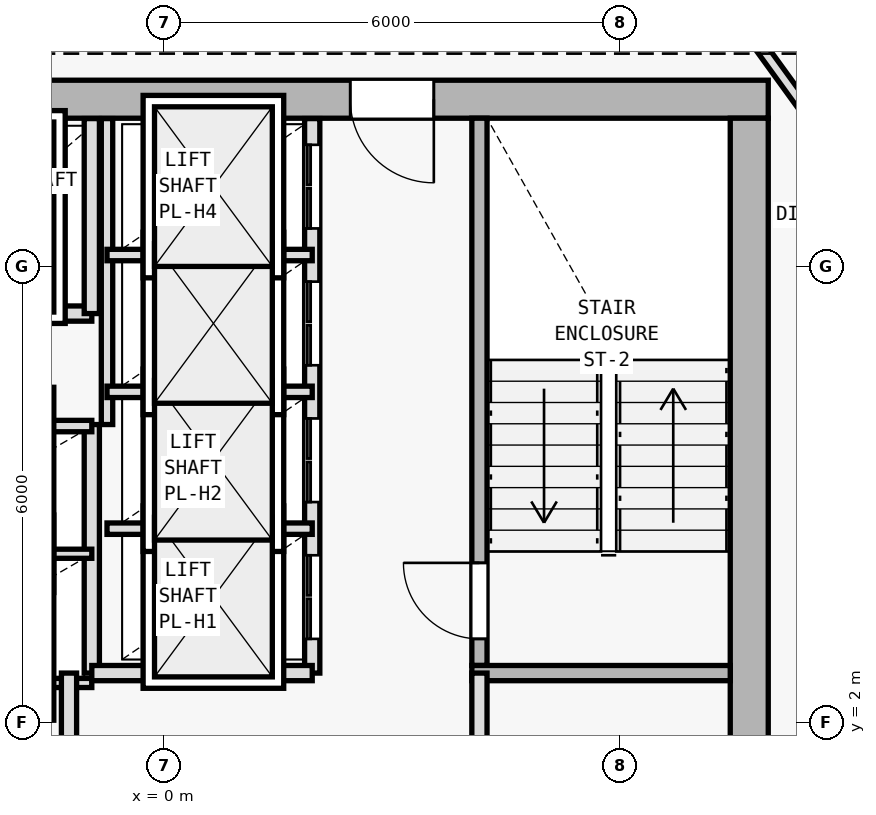
"""IFC4 building model, lengths in metres.
Left out: names, types, materials, properties, quantities, classifications, styles, units other than length and angle.
Written with IfcOpenShell. Run it as: python <this file> out.ifc"""

import sys

from ifc_helpers import new_model, si_unit, direction, frame, frame_2d, origin, origin_2d, place, context, subcontext, project, spatial, rectangle, i_section, extrude, element, fill, save


model = new_model("IFC4")
c1 = context("Model", 3, precision=1e-05, world=origin(), true_north=direction((0.0, 1.0)))
c2 = subcontext(c1, "Body", "Model", "MODEL_VIEW")
j1 = project(units=[si_unit("LENGTHUNIT", "METRE"), si_unit("PLANEANGLEUNIT", "RADIAN")], contexts=[c1])
p1 = place(None, origin())
s1 = spatial("IfcSite", under=j1, at=p1, CompositionType="ELEMENT")
p2 = place(p1, origin())
s2 = spatial("IfcBuilding", under=s1, at=p2, CompositionType="ELEMENT")
p3 = place(p2, frame((0.0, 0.0, 286.8)))
s3 = spatial("IfcBuildingStorey", under=s2, at=p3, CompositionType="ELEMENT", Elevation=286.8)
p4 = place(p3, frame((7.7, 10.2, 0.0), z_axis=(0.0, 0.0, 1.0), x_axis=(1.0, 0.0, 0.0)))
e1 = element("IfcColumn", 1, at=p4, inside=s3, PredefinedType="COLUMN", context=c2, shape_type="SweptSolid", body=[
    extrude(i_section(OverallWidth=0.374, OverallDepth=0.372, WebThickness=0.012, FlangeThickness=0.02, FilletRadius=0.015, at=origin_2d()), origin(), (0.0, 0.0, 1.0), 3.6),
])
p5 = place(p3, frame((7.95, 10.2, 0.0), z_axis=(0.0, 0.0, 1.0), x_axis=(-1.0, 0.0, 0.0)))
e2 = element("IfcWall", 2, at=p5, inside=s3, PredefinedType="SHEAR", context=c2, shape_type="SweptSolid", body=[
    extrude(rectangle(XDim=15.9, YDim=0.5, at=frame_2d((7.95, 0.0))), origin(), (0.0, 0.0, 1.0), 3.35),
])
p6 = place(p5, frame((4.4, 0.0, 0.0)))
e3 = element("IfcOpeningElement", 3, at=p6, cuts=e2, PredefinedType="OPENING", context=c2, shape_type="SweptSolid", body=[
    extrude(rectangle(XDim=1.1, YDim=2.15, at=frame_2d((0.55, 1.075))), frame((0.0, 0.26, 0.0), z_axis=(0.0, -1.0, 0.0), x_axis=(1.0, 0.0, 0.0)), (0.0, 0.0, 1.0), 0.52),
])
p7 = place(p3, frame((7.7, 9.95, 0.0), z_axis=(0.0, 0.0, 1.0), x_axis=(0.0, -1.0, 0.0)))
e4 = element("IfcWall", 4, at=p7, inside=s3, PredefinedType="SHEAR", context=c2, shape_type="SweptSolid", body=[
    extrude(rectangle(XDim=19.1, YDim=0.5, at=frame_2d((9.55, 0.0))), origin(), (0.0, 0.0, 1.0), 3.35),
])
p8 = place(p3, frame((4.15, 2.75, 0.0), z_axis=(0.0, 0.0, 1.0), x_axis=(0.0, 1.0, 0.0)))
e5 = element("IfcWall", 5, at=p8, inside=s3, PredefinedType="SOLIDWALL", context=c2, shape_type="SweptSolid", body=[
    extrude(rectangle(XDim=7.2, YDim=0.2, at=frame_2d((3.6, 0.0))), origin(), (0.0, 0.0, 1.0), 3.35),
])
p9 = place(p8, frame((0.35, 0.0, 0.0)))
e6 = element("IfcOpeningElement", 6, at=p9, cuts=e5, PredefinedType="OPENING", context=c2, shape_type="SweptSolid", body=[
    extrude(rectangle(XDim=1.0, YDim=2.15, at=frame_2d((0.5, 1.075))), frame((0.0, 0.11, 0.0), z_axis=(0.0, -1.0, 0.0), x_axis=(1.0, 0.0, 0.0)), (0.0, 0.0, 1.0), 0.22),
])
p10 = place(p3, frame((4.05, 2.65, 0.0), z_axis=(0.0, 0.0, 1.0), x_axis=(1.0, 0.0, 0.0)))
e7 = element("IfcWall", 7, at=p10, inside=s3, PredefinedType="SOLIDWALL", context=c2, shape_type="SweptSolid", body=[
    extrude(rectangle(XDim=3.4, YDim=0.2, at=frame_2d((1.7, 0.0))), origin(), (0.0, 0.0, 1.0), 3.35),
])
p11 = place(p3, frame((-0.95, 2.65, 0.0), z_axis=(0.0, 0.0, 1.0), x_axis=(0.0, 1.0, 0.0)))
e8 = element("IfcWall", 8, at=p11, inside=s3, PredefinedType="SOLIDWALL", context=c2, shape_type="SweptSolid", body=[
    extrude(rectangle(XDim=3.27, YDim=0.2, at=frame_2d((1.635, 0.0))), origin(), (0.0, 0.0, 1.0), 3.35),
])
for number, where, z_axis, x_axis in (
    (9, (-3.85, 2.52, 0.0), (0.0, 0.0, 1.0), (1.0, 0.0, 0.0)),
    (10, (-3.85, 4.22, 0.0), (0.0, 0.0, 1.0), (1.0, 0.0, 0.0)),
):
    element("IfcWall", number, at=place(p3, frame(where, z_axis=z_axis, x_axis=x_axis)), inside=s3, PredefinedType="PARTITIONING", context=c2, shape_type="SweptSolid", body=[
        extrude(rectangle(XDim=2.9, YDim=0.12, at=frame_2d((1.45, 0.0))), origin(), (0.0, 0.0, 1.0), 3.35),
    ])
p12 = place(p3, frame((-3.85, 5.9, 0.0), z_axis=(0.0, 0.0, 1.0), x_axis=(1.0, 0.0, 0.0)))
e11 = element("IfcWall", 11, at=p12, inside=s3, PredefinedType="PARTITIONING", context=c2, shape_type="SweptSolid", body=[
    extrude(rectangle(XDim=2.9, YDim=0.15, at=frame_2d((1.45, 0.0))), origin(), (0.0, 0.0, 1.0), 3.35),
])
p13 = place(p3, frame((-3.85, 7.38, 0.0), z_axis=(0.0, 0.0, 1.0), x_axis=(1.0, 0.0, 0.0)))
e12 = element("IfcWall", 12, at=p13, inside=s3, PredefinedType="SOLIDWALL", context=c2, shape_type="SweptSolid", body=[
    extrude(rectangle(XDim=2.9, YDim=0.2, at=frame_2d((1.45, 0.0))), origin(), (0.0, 0.0, 1.0), 3.35),
])
p14 = place(p13, frame((0.85, 0.0, 0.0)))
e13 = element("IfcOpeningElement", 13, at=p14, cuts=e12, PredefinedType="OPENING", context=c2, shape_type="SweptSolid", body=[
    extrude(rectangle(XDim=1.2, YDim=2.2, at=frame_2d((0.6, 1.1))), frame((0.0, 0.11, 0.0), z_axis=(0.0, -1.0, 0.0), x_axis=(1.0, 0.0, 0.0)), (0.0, 0.0, 1.0), 0.22),
])
p15 = place(p3, frame((-0.95, 7.38, 0.0), z_axis=(0.0, 0.0, 1.0), x_axis=(0.0, 1.0, 0.0)))
e14 = element("IfcWall", 14, at=p15, inside=s3, PredefinedType="SOLIDWALL", context=c2, shape_type="SweptSolid", body=[
    extrude(rectangle(XDim=2.565, YDim=0.2, at=frame_2d((1.283, 0.0))), origin(), (0.0, 0.0, 1.0), 3.35),
])
p16 = place(p3, frame((4.15, -6.05, 0.0), z_axis=(0.0, 0.0, 1.0), x_axis=(0.0, 1.0, 0.0)))
e15 = element("IfcWall", 15, at=p16, inside=s3, PredefinedType="SOLIDWALL", context=c2, shape_type="SweptSolid", body=[
    extrude(rectangle(XDim=8.7, YDim=0.2, at=frame_2d((4.35, 0.0))), origin(), (0.0, 0.0, 1.0), 3.35),
])
p17 = place(p16, frame((3.6, 0.0, 0.0)))
e16 = element("IfcOpeningElement", 16, at=p17, cuts=e15, PredefinedType="OPENING", context=c2, shape_type="SweptSolid", body=[
    extrude(rectangle(XDim=0.95, YDim=2.1, at=frame_2d((0.475, 1.05))), frame((0.0, 0.11, 0.0), z_axis=(0.0, -1.0, 0.0), x_axis=(1.0, 0.0, 0.0)), (0.0, 0.0, 1.0), 0.22),
])
p18 = place(p3, frame((-1.25, -6.05, 0.0), z_axis=(0.0, 0.0, 1.0), x_axis=(0.0, 1.0, 0.0)))
e17 = element("IfcWall", 17, at=p18, inside=s3, PredefinedType="SOLIDWALL", context=c2, shape_type="SweptSolid", body=[
    extrude(rectangle(XDim=8.7, YDim=0.2, at=frame_2d((4.35, 0.0))), origin(), (0.0, 0.0, 1.0), 3.35),
])
p19 = place(p18, frame((3.4, 0.0, 0.0)))
e18 = element("IfcOpeningElement", 18, at=p19, cuts=e17, PredefinedType="OPENING", context=c2, shape_type="SweptSolid", body=[
    extrude(rectangle(XDim=0.95, YDim=2.1, at=frame_2d((0.475, 1.05))), frame((0.0, 0.11, 0.0), z_axis=(0.0, -1.0, 0.0), x_axis=(1.0, 0.0, 0.0)), (0.0, 0.0, 1.0), 0.22),
])
p20 = place(p3, frame((1.95, 2.65, 0.0), z_axis=(0.0, 0.0, 1.0), x_axis=(0.0, 1.0, 0.0)))
e19 = element("IfcWall", 19, at=p20, inside=s3, PredefinedType="SOLIDWALL", context=c2, shape_type="SweptSolid", body=[
    extrude(rectangle(XDim=7.295, YDim=0.2, at=frame_2d((3.647, 0.0))), origin(), (0.0, 0.0, 1.0), 3.35),
])
p21 = place(p20, frame((0.45, 0.0, 0.0)))
e20 = element("IfcOpeningElement", 20, at=p21, cuts=e19, PredefinedType="OPENING", context=c2, shape_type="SweptSolid", body=[
    extrude(rectangle(XDim=1.1, YDim=2.15, at=frame_2d((0.55, 1.075))), frame((0.0, 0.11, 0.0), z_axis=(0.0, -1.0, 0.0), x_axis=(1.0, 0.0, 0.0)), (0.0, 0.0, 1.0), 0.22),
])
p22 = place(p20, frame((2.25, 0.0, 0.0)))
e21 = element("IfcOpeningElement", 21, at=p22, cuts=e19, PredefinedType="OPENING", context=c2, shape_type="SweptSolid", body=[
    extrude(rectangle(XDim=1.1, YDim=2.15, at=frame_2d((0.55, 1.075))), frame((0.0, 0.11, 0.0), z_axis=(0.0, -1.0, 0.0), x_axis=(1.0, 0.0, 0.0)), (0.0, 0.0, 1.0), 0.22),
])
p23 = place(p20, frame((4.05, 0.0, 0.0)))
e22 = element("IfcOpeningElement", 22, at=p23, cuts=e19, PredefinedType="OPENING", context=c2, shape_type="SweptSolid", body=[
    extrude(rectangle(XDim=1.1, YDim=2.15, at=frame_2d((0.55, 1.075))), frame((0.0, 0.11, 0.0), z_axis=(0.0, -1.0, 0.0), x_axis=(1.0, 0.0, 0.0)), (0.0, 0.0, 1.0), 0.22),
])
p24 = place(p20, frame((5.85, 0.0, 0.0)))
e23 = element("IfcOpeningElement", 23, at=p24, cuts=e19, PredefinedType="OPENING", context=c2, shape_type="SweptSolid", body=[
    extrude(rectangle(XDim=1.1, YDim=2.15, at=frame_2d((0.55, 1.075))), frame((0.0, 0.11, 0.0), z_axis=(0.0, -1.0, 0.0), x_axis=(1.0, 0.0, 0.0)), (0.0, 0.0, 1.0), 0.22),
])
p25 = place(p3, frame((-0.95, 2.65, 0.0), z_axis=(0.0, 0.0, 1.0), x_axis=(1.0, 0.0, 0.0)))
e24 = element("IfcWall", 24, at=p25, inside=s3, PredefinedType="SOLIDWALL", context=c2, shape_type="SweptSolid", body=[
    extrude(rectangle(XDim=2.9, YDim=0.2, at=frame_2d((1.45, 0.0))), origin(), (0.0, 0.0, 1.0), 3.35),
])
p26 = place(p3, frame((-0.75, 5.92, 0.0), z_axis=(0.0, 0.0, 1.0), x_axis=(0.0, 1.0, 0.0)))
e25 = element("IfcWall", 25, at=p26, inside=s3, PredefinedType="PARTITIONING", context=c2, shape_type="SweptSolid", body=[
    extrude(rectangle(XDim=4.025, YDim=0.15, at=frame_2d((2.013, 0.0))), origin(), (0.0, 0.0, 1.0), 3.35),
])
for number, where, z_axis, x_axis in (
    (26, (-0.75, 4.55, 0.0), (0.0, 0.0, 1.0), (1.0, 0.0, 0.0)),
    (27, (-0.75, 6.35, 0.0), (0.0, 0.0, 1.0), (1.0, 0.0, 0.0)),
    (28, (-0.75, 8.15, 0.0), (0.0, 0.0, 1.0), (1.0, 0.0, 0.0)),
):
    element("IfcWall", number, at=place(p3, frame(where, z_axis=z_axis, x_axis=x_axis)), inside=s3, PredefinedType="PARTITIONING", context=c2, shape_type="SweptSolid", body=[
        extrude(rectangle(XDim=2.7, YDim=0.15, at=frame_2d((1.35, 0.0))), origin(), (0.0, 0.0, 1.0), 3.35),
    ])
p27 = place(p3, frame((6.841, 12.28, 0.0), z_axis=(0.0, 0.0, 1.0), x_axis=(0.586956386413, -0.809618552436, 0.0)))
e29 = element("IfcWall", 29, at=p27, inside=s3, PredefinedType="PARTITIONING", context=c2, shape_type="SweptSolid", body=[
    extrude(rectangle(XDim=5.008, YDim=0.15, at=frame_2d((2.504, 0.0))), origin(), (0.0, 0.0, 1.0), 2.825),
])
p28 = place(p27, frame((2.954, 0.0, 0.0)))
e30 = element("IfcOpeningElement", 30, at=p28, cuts=e29, PredefinedType="OPENING", context=c2, shape_type="SweptSolid", body=[
    extrude(rectangle(XDim=0.9, YDim=2.1, at=frame_2d((0.45, 1.05))), frame((0.0, 0.085, 0.0), z_axis=(0.0, -1.0, 0.0), x_axis=(1.0, 0.0, 0.0)), (0.0, 0.0, 1.0), 0.17),
])
p29 = place(p6, origin())
e31 = element("IfcDoor", 31, at=p29, inside=s3, OperationType="SINGLE_SWING_LEFT", PredefinedType="DOOR", context=c2, shape_type="SweptSolid", body=[
    extrude(rectangle(XDim=1.1, YDim=2.15, at=frame_2d((0.55, 1.075))), frame((0.0, 0.025, 0.0), z_axis=(0.0, -1.0, 0.0), x_axis=(1.0, 0.0, 0.0)), (0.0, 0.0, 1.0), 0.05),
])
fill(e3, e31)
p30 = place(p9, origin())
e32 = element("IfcDoor", 32, at=p30, inside=s3, OperationType="SINGLE_SWING_RIGHT", PredefinedType="DOOR", context=c2, shape_type="SweptSolid", body=[
    extrude(rectangle(XDim=1.0, YDim=2.15, at=frame_2d((0.5, 1.075))), frame((0.0, 0.025, 0.0), z_axis=(0.0, -1.0, 0.0), x_axis=(1.0, 0.0, 0.0)), (0.0, 0.0, 1.0), 0.05),
])
fill(e6, e32)
p31 = place(p21, origin())
e33 = element("IfcDoor", 33, at=p31, inside=s3, OperationType="DOUBLE_DOOR_SLIDING", PredefinedType="DOOR", context=c2, shape_type="SweptSolid", body=[
    extrude(rectangle(XDim=1.1, YDim=2.15, at=frame_2d((0.55, 1.075))), frame((0.0, 0.025, 0.0), z_axis=(0.0, -1.0, 0.0), x_axis=(1.0, 0.0, 0.0)), (0.0, 0.0, 1.0), 0.05),
])
fill(e20, e33)
p32 = place(p22, origin())
e34 = element("IfcDoor", 34, at=p32, inside=s3, OperationType="DOUBLE_DOOR_SLIDING", PredefinedType="DOOR", context=c2, shape_type="SweptSolid", body=[
    extrude(rectangle(XDim=1.1, YDim=2.15, at=frame_2d((0.55, 1.075))), frame((0.0, 0.025, 0.0), z_axis=(0.0, -1.0, 0.0), x_axis=(1.0, 0.0, 0.0)), (0.0, 0.0, 1.0), 0.05),
])
fill(e21, e34)
p33 = place(p23, origin())
e35 = element("IfcDoor", 35, at=p33, inside=s3, OperationType="DOUBLE_DOOR_SLIDING", PredefinedType="DOOR", context=c2, shape_type="SweptSolid", body=[
    extrude(rectangle(XDim=1.1, YDim=2.15, at=frame_2d((0.55, 1.075))), frame((0.0, 0.025, 0.0), z_axis=(0.0, -1.0, 0.0), x_axis=(1.0, 0.0, 0.0)), (0.0, 0.0, 1.0), 0.05),
])
fill(e22, e35)
p34 = place(p24, origin())
e36 = element("IfcDoor", 36, at=p34, inside=s3, OperationType="DOUBLE_DOOR_SLIDING", PredefinedType="DOOR", context=c2, shape_type="SweptSolid", body=[
    extrude(rectangle(XDim=1.1, YDim=2.15, at=frame_2d((0.55, 1.075))), frame((0.0, 0.025, 0.0), z_axis=(0.0, -1.0, 0.0), x_axis=(1.0, 0.0, 0.0)), (0.0, 0.0, 1.0), 0.05),
])
fill(e23, e36)
save(model, sys.argv[1])
